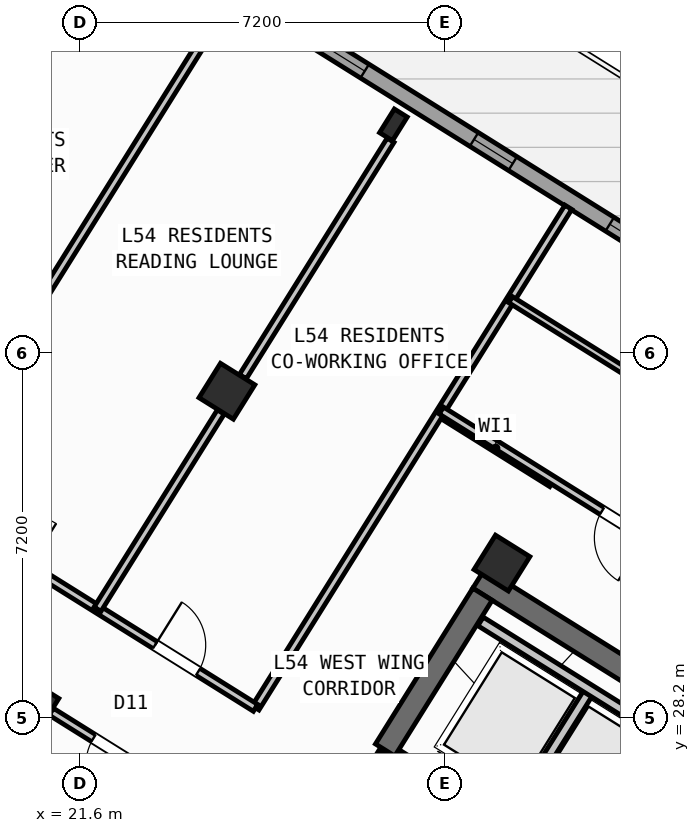
"""IFC4 building model, lengths in metres.
Left out: names, types, materials, properties, quantities, classifications, styles, units other than length and angle.
Written with IfcOpenShell. Run it as: python <this file> out.ifc"""

import sys

from ifc_helpers import new_model, si_unit, direction, frame, frame_2d, origin, origin_2d, place, context, subcontext, project, spatial, rectangle, hollow_rectangle, i_section, extrude, source, transform, mapped, element, fill, save


model = new_model("IFC4")
c1 = context("Model", 3, precision=1e-05, world=origin(), true_north=direction((0.0, 1.0)))
c2 = subcontext(c1, "Body", "Model", "MODEL_VIEW")
j1 = project(units=[si_unit("LENGTHUNIT", "METRE"), si_unit("PLANEANGLEUNIT", "RADIAN")], contexts=[c1])
p1 = place(None, origin())
s1 = spatial("IfcSite", under=j1, at=p1, CompositionType="ELEMENT")
p2 = place(p1, origin())
s2 = spatial("IfcBuilding", under=s1, at=p2, CompositionType="ELEMENT")
p3 = place(p2, frame((0.0, 0.0, 214.8)))
s3 = spatial("IfcBuildingStorey", under=s2, at=p3, CompositionType="ELEMENT", Elevation=214.8)
p4 = place(p3, frame((40.531, 24.036, 0.0), z_axis=(0.0, 0.0, 1.0), x_axis=(-0.848048787466, 0.529918157905, 0.0)))
e1 = element("IfcWall", 1, at=p4, inside=s3, PredefinedType="SHEAR", context=c2, shape_type="SweptSolid", body=[
    extrude(rectangle(XDim=13.04, YDim=0.45, at=frame_2d((6.52, 0.0))), origin(), (0.0, 0.0, 1.0), 3.35),
])
p5 = place(p3, frame((29.544, 30.636, 0.0), z_axis=(0.0, 0.0, 1.0), x_axis=(-0.529902075036, -0.848058836916, 0.0)))
e2 = element("IfcWall", 2, at=p5, inside=s3, PredefinedType="SHEAR", context=c2, shape_type="SweptSolid", body=[
    extrude(rectangle(XDim=3.625, YDim=0.45, at=frame_2d((1.812, 0.0))), origin(), (0.0, 0.0, 1.0), 3.35),
])
m1 = source(origin(), c2, "Body", "SweptSolid", [
    extrude(hollow_rectangle(XDim=0.8, YDim=0.8, WallThickness=0.032, at=origin_2d()), origin(), (0.0, 0.0, 1.0), 3.6),
])
p6 = place(p3, frame((29.928, 31.251, 0.0), z_axis=(0.0, 0.0, 1.0), x_axis=(-0.848048096156, 0.529919264233, 0.0)))
e3 = element("IfcColumn", 3, at=p6, inside=s3, PredefinedType="COLUMN", context=c2, shape_type="MappedRepresentation", body=[
    mapped(m1, transform((0.0, 0.0, 0.0), scale=1.0)),
])
m2 = source(origin(), c2, "Body", "SweptSolid", [
    extrude(i_section(OverallWidth=0.3, OverallDepth=0.55, WebThickness=0.015, FlangeThickness=0.029, at=origin_2d()), origin(), (0.0, 0.0, 1.0), 3.6),
])
p7 = place(p3, frame((27.786, 39.901, 0.0), z_axis=(0.0, 0.0, 1.0), x_axis=(-0.848048096156, 0.529919264233, 0.0)))
e4 = element("IfcColumn", 4, at=p7, inside=s3, PredefinedType="COLUMN", context=c2, shape_type="MappedRepresentation", body=[
    mapped(m2, transform((0.0, 0.0, 0.0), scale=1.0)),
])
for number, where, z_axis, x_axis in (
    (5, (24.5, 34.643, 0.0), (0.0, 0.0, 1.0), (-0.848, 0.53, 0.0)),
    (6, (20.632, 28.452, 0.0), (0.0, 0.0, 1.0), (-0.848, 0.53, 0.0)),
):
    element("IfcColumn", number, at=place(p3, frame(where, z_axis=z_axis, x_axis=x_axis)), inside=s3, PredefinedType="COLUMN", context=c2, shape_type="MappedRepresentation", body=[
        mapped(m1, transform((0.0, 0.0, 0.0), scale=1.0)),
    ])
p8 = place(p3, frame((31.76, 12.183, 0.0), z_axis=(0.0, 0.0, 1.0), x_axis=(-0.848047074256, 0.529920899612, 0.0)))
e7 = element("IfcWall", 7, at=p8, inside=s3, PredefinedType="STANDARD", context=c2, shape_type="SweptSolid", body=[
    extrude(rectangle(XDim=30.652, YDim=0.32, at=frame_2d((15.326, 0.0))), origin(), (0.0, 0.0, 1.0), 3.35),
])
p9 = place(p8, frame((15.166, 0.0, 0.0)))
e8 = element("IfcOpeningElement", 8, at=p9, cuts=e7, PredefinedType="OPENING", context=c2, shape_type="SweptSolid", body=[
    extrude(rectangle(XDim=1.2, YDim=2.15, at=frame_2d((0.6, 1.075))), frame((0.0, 0.17, 0.0), z_axis=(0.0, -1.0, 0.0), x_axis=(1.0, 0.0, 0.0)), (0.0, 0.0, 1.0), 0.34),
])
p10 = place(p8, frame((2.24, 0.0, 0.9)))
e9 = element("IfcOpeningElement", 9, at=p10, cuts=e7, PredefinedType="OPENING", context=c2, shape_type="SweptSolid", body=[
    extrude(rectangle(XDim=1.65, YDim=1.45, at=frame_2d((0.825, 0.725))), frame((0.0, 0.17, 0.0), z_axis=(0.0, -1.0, 0.0), x_axis=(1.0, 0.0, 0.0)), (0.0, 0.0, 1.0), 0.34),
])
p11 = place(p8, frame((7.469, 0.0, 0.9)))
e10 = element("IfcOpeningElement", 10, at=p11, cuts=e7, PredefinedType="OPENING", context=c2, shape_type="SweptSolid", body=[
    extrude(rectangle(XDim=1.65, YDim=1.45, at=frame_2d((0.825, 0.725))), frame((0.0, 0.17, 0.0), z_axis=(0.0, -1.0, 0.0), x_axis=(1.0, 0.0, 0.0)), (0.0, 0.0, 1.0), 0.34),
])
p12 = place(p8, frame((12.623, 0.0, 1.0)))
e11 = element("IfcOpeningElement", 11, at=p12, cuts=e7, PredefinedType="OPENING", context=c2, shape_type="SweptSolid", body=[
    extrude(rectangle(XDim=0.9, YDim=1.25, at=frame_2d((0.45, 0.625))), frame((0.0, 0.17, 0.0), z_axis=(0.0, -1.0, 0.0), x_axis=(1.0, 0.0, 0.0)), (0.0, 0.0, 1.0), 0.34),
])
p13 = place(p8, frame((19.715, 0.0, 1.0)))
e12 = element("IfcOpeningElement", 12, at=p13, cuts=e7, PredefinedType="OPENING", context=c2, shape_type="SweptSolid", body=[
    extrude(rectangle(XDim=0.9, YDim=1.25, at=frame_2d((0.45, 0.625))), frame((0.0, 0.17, 0.0), z_axis=(0.0, -1.0, 0.0), x_axis=(1.0, 0.0, 0.0)), (0.0, 0.0, 1.0), 0.34),
])
p14 = place(p8, frame((25.566, 0.0, 0.9)))
e13 = element("IfcOpeningElement", 13, at=p14, cuts=e7, PredefinedType="OPENING", context=c2, shape_type="SweptSolid", body=[
    extrude(rectangle(XDim=1.65, YDim=1.45, at=frame_2d((0.825, 0.725))), frame((0.0, 0.17, 0.0), z_axis=(0.0, -1.0, 0.0), x_axis=(1.0, 0.0, 0.0)), (0.0, 0.0, 1.0), 0.34),
])
p15 = place(p8, frame((28.896, 0.0, 1.0)))
e14 = element("IfcOpeningElement", 14, at=p15, cuts=e7, PredefinedType="OPENING", context=c2, shape_type="SweptSolid", body=[
    extrude(rectangle(XDim=0.9, YDim=1.25, at=frame_2d((0.45, 0.625))), frame((0.0, 0.17, 0.0), z_axis=(0.0, -1.0, 0.0), x_axis=(1.0, 0.0, 0.0)), (0.0, 0.0, 1.0), 0.34),
])
p16 = place(p3, frame((17.424, 47.083, 0.0), z_axis=(0.0, 0.0, 1.0), x_axis=(0.848049927979, -0.529916332693, 0.0)))
e15 = element("IfcWall", 15, at=p16, inside=s3, PredefinedType="STANDARD", context=c2, shape_type="SweptSolid", body=[
    extrude(rectangle(XDim=29.223, YDim=0.32, at=frame_2d((14.612, 0.0))), origin(), (0.0, 0.0, 1.0), 3.35),
])
p17 = place(p16, frame((2.526, 0.0, 0.0)))
e16 = element("IfcOpeningElement", 16, at=p17, cuts=e15, PredefinedType="OPENING", context=c2, shape_type="SweptSolid", body=[
    extrude(rectangle(XDim=1.05, YDim=2.15, at=frame_2d((0.525, 1.075))), frame((0.0, 0.17, 0.0), z_axis=(0.0, -1.0, 0.0), x_axis=(1.0, 0.0, 0.0)), (0.0, 0.0, 1.0), 0.34),
])
p18 = place(p16, frame((0.653, 0.0, 0.9)))
e17 = element("IfcOpeningElement", 17, at=p18, cuts=e15, PredefinedType="OPENING", context=c2, shape_type="SweptSolid", body=[
    extrude(rectangle(XDim=1.35, YDim=1.45, at=frame_2d((0.675, 0.725))), frame((0.0, 0.17, 0.0), z_axis=(0.0, -1.0, 0.0), x_axis=(1.0, 0.0, 0.0)), (0.0, 0.0, 1.0), 0.34),
])
p19 = place(p16, frame((6.897, 0.0, 1.0)))
e18 = element("IfcOpeningElement", 18, at=p19, cuts=e15, PredefinedType="OPENING", context=c2, shape_type="SweptSolid", body=[
    extrude(rectangle(XDim=0.9, YDim=1.25, at=frame_2d((0.45, 0.625))), frame((0.0, 0.17, 0.0), z_axis=(0.0, -1.0, 0.0), x_axis=(1.0, 0.0, 0.0)), (0.0, 0.0, 1.0), 0.34),
])
p20 = place(p16, frame((9.602, 0.0, 0.95)))
e19 = element("IfcOpeningElement", 19, at=p20, cuts=e15, PredefinedType="OPENING", context=c2, shape_type="SweptSolid", body=[
    extrude(rectangle(XDim=1.95, YDim=1.35, at=frame_2d((0.975, 0.675))), frame((0.0, 0.17, 0.0), z_axis=(0.0, -1.0, 0.0), x_axis=(1.0, 0.0, 0.0)), (0.0, 0.0, 1.0), 0.34),
])
p21 = place(p16, frame((14.096, 0.0, 1.0)))
e20 = element("IfcOpeningElement", 20, at=p21, cuts=e15, PredefinedType="OPENING", context=c2, shape_type="SweptSolid", body=[
    extrude(rectangle(XDim=0.9, YDim=1.25, at=frame_2d((0.45, 0.625))), frame((0.0, 0.17, 0.0), z_axis=(0.0, -1.0, 0.0), x_axis=(1.0, 0.0, 0.0)), (0.0, 0.0, 1.0), 0.34),
])
p22 = place(p16, frame((17.254, 0.0, 1.0)))
e21 = element("IfcOpeningElement", 21, at=p22, cuts=e15, PredefinedType="OPENING", context=c2, shape_type="SweptSolid", body=[
    extrude(rectangle(XDim=0.9, YDim=1.25, at=frame_2d((0.45, 0.625))), frame((0.0, 0.17, 0.0), z_axis=(0.0, -1.0, 0.0), x_axis=(1.0, 0.0, 0.0)), (0.0, 0.0, 1.0), 0.34),
])
p23 = place(p16, frame((21.139, 0.0, 0.9)))
e22 = element("IfcOpeningElement", 22, at=p23, cuts=e15, PredefinedType="OPENING", context=c2, shape_type="SweptSolid", body=[
    extrude(rectangle(XDim=1.35, YDim=1.45, at=frame_2d((0.675, 0.725))), frame((0.0, 0.17, 0.0), z_axis=(0.0, -1.0, 0.0), x_axis=(1.0, 0.0, 0.0)), (0.0, 0.0, 1.0), 0.34),
])
p24 = place(p16, frame((25.778, 0.0, 0.9)))
e23 = element("IfcOpeningElement", 23, at=p24, cuts=e15, PredefinedType="OPENING", context=c2, shape_type="SweptSolid", body=[
    extrude(rectangle(XDim=1.35, YDim=1.45, at=frame_2d((0.675, 0.725))), frame((0.0, 0.17, 0.0), z_axis=(0.0, -1.0, 0.0), x_axis=(1.0, 0.0, 0.0)), (0.0, 0.0, 1.0), 0.34),
])
p25 = place(p3, frame((33.496, 27.677, 0.0), z_axis=(0.0, 0.0, 1.0), x_axis=(-0.529908658664, -0.84805472316, 0.0)))
e24 = element("IfcWall", 24, at=p25, inside=s3, PredefinedType="SHEAR", context=c2, shape_type="SweptSolid", body=[
    extrude(rectangle(XDim=3.16, YDim=0.26, at=frame_2d((1.58, 0.0))), origin(), (0.0, 0.0, 1.0), 3.35),
])
p26 = place(p3, frame((31.822, 24.998, 0.0), z_axis=(0.0, 0.0, 1.0), x_axis=(-0.848054125777, 0.529909614701, 0.0)))
e25 = element("IfcWall", 25, at=p26, inside=s3, PredefinedType="STANDARD", context=c2, shape_type="SweptSolid", body=[
    extrude(rectangle(XDim=4.668, YDim=0.2, at=frame_2d((2.334, 0.0))), origin(), (0.0, 0.0, 1.0), 3.34),
])
p27 = place(p26, frame((0.52, 0.0, 0.0)))
e26 = element("IfcOpeningElement", 26, at=p27, cuts=e25, PredefinedType="OPENING", context=c2, shape_type="SweptSolid", body=[
    extrude(rectangle(XDim=1.2, YDim=2.15, at=frame_2d((0.6, 1.075))), frame((0.0, 0.11, 0.0), z_axis=(0.0, -1.0, 0.0), x_axis=(1.0, 0.0, 0.0)), (0.0, 0.0, 1.0), 0.22),
])
p28 = place(p26, frame((2.54, 0.0, 0.0)))
e27 = element("IfcOpeningElement", 27, at=p28, cuts=e25, PredefinedType="OPENING", context=c2, shape_type="SweptSolid", body=[
    extrude(rectangle(XDim=1.2, YDim=2.15, at=frame_2d((0.6, 1.075))), frame((0.0, 0.11, 0.0), z_axis=(0.0, -1.0, 0.0), x_axis=(1.0, 0.0, 0.0)), (0.0, 0.0, 1.0), 0.22),
])
p29 = place(p3, frame((31.645, 28.716, 0.0), z_axis=(0.0, 0.0, 1.0), x_axis=(-0.52986693015, -0.848080795876, 0.0)))
e28 = element("IfcWall", 28, at=p29, inside=s3, PredefinedType="STANDARD", context=c2, shape_type="SweptSolid", body=[
    extrude(rectangle(XDim=2.66, YDim=0.2, at=frame_2d((1.33, 0.0))), origin(), (0.0, 0.0, 1.0), 3.34),
])
p30 = place(p3, frame((33.363, 27.69, 0.0), z_axis=(0.0, 0.0, 1.0), x_axis=(-0.84804957148, 0.529916903215, 0.0)))
e29 = element("IfcWall", 29, at=p30, inside=s3, PredefinedType="STANDARD", context=c2, shape_type="SweptSolid", body=[
    extrude(rectangle(XDim=4.548, YDim=0.2, at=frame_2d((2.274, 0.0))), origin(), (0.0, 0.0, 1.0), 3.34),
])
p31 = place(p3, frame((27.596, 27.52, 0.0), z_axis=(0.0, 0.0, 1.0), x_axis=(-0.529865479138, -0.848081702443, 0.0)))
e30 = element("IfcWall", 30, at=p31, inside=s3, PredefinedType="STANDARD", context=c2, shape_type="SweptSolid", body=[
    extrude(rectangle(XDim=2.96, YDim=0.2, at=frame_2d((1.48, 0.0))), origin(), (0.0, 0.0, 1.0), 3.34),
])
p32 = place(p31, frame((0.7, 0.0, 0.0)))
e31 = element("IfcOpeningElement", 31, at=p32, cuts=e30, PredefinedType="OPENING", context=c2, shape_type="SweptSolid", body=[
    extrude(rectangle(XDim=1.5, YDim=2.15, at=frame_2d((0.75, 1.075))), frame((0.0, 0.11, 0.0), z_axis=(0.0, -1.0, 0.0), x_axis=(1.0, 0.0, 0.0)), (0.0, 0.0, 1.0), 0.22),
])
p33 = place(p3, frame((30.914, 32.829, 0.0), z_axis=(0.0, 0.0, 1.0), x_axis=(-0.848008813643, 0.529982124211, 0.0)))
e32 = element("IfcWall", 32, at=p33, inside=s3, PredefinedType="PARTITIONING", context=c2, shape_type="SweptSolid", body=[
    extrude(rectangle(XDim=2.61, YDim=0.16, at=frame_2d((1.305, 0.0))), origin(), (0.0, 0.0, 1.0), 3.34),
])
p34 = place(p3, frame((31.239, 38.274, 0.0), z_axis=(0.0, 0.0, 1.0), x_axis=(-0.529925472745, -0.848044216616, 0.0)))
e33 = element("IfcWall", 33, at=p34, inside=s3, PredefinedType="PARTITIONING", context=c2, shape_type="SweptSolid", body=[
    extrude(rectangle(XDim=11.65, YDim=0.16, at=frame_2d((5.825, 0.0))), origin(), (0.0, 0.0, 1.0), 3.34),
])
p35 = place(p3, frame((25.065, 28.394, 0.0), z_axis=(0.0, 0.0, 1.0), x_axis=(-0.848048310262, 0.529918921593, 0.0)))
e34 = element("IfcWall", 34, at=p35, inside=s3, PredefinedType="PARTITIONING", context=c2, shape_type="SweptSolid", body=[
    extrude(rectangle(XDim=16.73, YDim=0.16, at=frame_2d((8.365, 0.0))), origin(), (0.0, 0.0, 1.0), 3.34),
])
p36 = place(p35, frame((1.338, 0.0, 0.0)))
e35 = element("IfcOpeningElement", 35, at=p36, cuts=e34, PredefinedType="OPENING", context=c2, shape_type="SweptSolid", body=[
    extrude(rectangle(XDim=1.0, YDim=2.1, at=frame_2d((0.5, 1.05))), frame((0.0, 0.09, 0.0), z_axis=(0.0, -1.0, 0.0), x_axis=(1.0, 0.0, 0.0)), (0.0, 0.0, 1.0), 0.18),
])
p37 = place(p35, frame((5.265, 0.0, 0.0)))
e36 = element("IfcOpeningElement", 36, at=p37, cuts=e34, PredefinedType="OPENING", context=c2, shape_type="SweptSolid", body=[
    extrude(rectangle(XDim=1.0, YDim=2.1, at=frame_2d((0.5, 1.05))), frame((0.0, 0.09, 0.0), z_axis=(0.0, -1.0, 0.0), x_axis=(1.0, 0.0, 0.0)), (0.0, 0.0, 1.0), 0.18),
])
p38 = place(p35, frame((9.526, 0.0, 0.0)))
e37 = element("IfcOpeningElement", 37, at=p38, cuts=e34, PredefinedType="OPENING", context=c2, shape_type="SweptSolid", body=[
    extrude(rectangle(XDim=1.0, YDim=2.1, at=frame_2d((0.5, 1.05))), frame((0.0, 0.09, 0.0), z_axis=(0.0, -1.0, 0.0), x_axis=(1.0, 0.0, 0.0)), (0.0, 0.0, 1.0), 0.18),
])
p39 = place(p35, frame((13.954, 0.0, 0.0)))
e38 = element("IfcOpeningElement", 38, at=p39, cuts=e34, PredefinedType="OPENING", context=c2, shape_type="SweptSolid", body=[
    extrude(rectangle(XDim=1.0, YDim=2.1, at=frame_2d((0.5, 1.05))), frame((0.0, 0.09, 0.0), z_axis=(0.0, -1.0, 0.0), x_axis=(1.0, 0.0, 0.0)), (0.0, 0.0, 1.0), 0.18),
])
p40 = place(p3, frame((23.899, 26.529, 0.0), z_axis=(0.0, 0.0, 1.0), x_axis=(-0.848055143312, 0.529907986259, 0.0)))
e39 = element("IfcWall", 39, at=p40, inside=s3, PredefinedType="PARTITIONING", context=c2, shape_type="SweptSolid", body=[
    extrude(rectangle(XDim=3.378, YDim=0.16, at=frame_2d((1.689, 0.0))), origin(), (0.0, 0.0, 1.0), 2.825),
])
p41 = place(p40, frame((1.395, 0.0, 0.0)))
e40 = element("IfcOpeningElement", 40, at=p41, cuts=e39, PredefinedType="OPENING", context=c2, shape_type="SweptSolid", body=[
    extrude(rectangle(XDim=1.0, YDim=2.1, at=frame_2d((0.5, 1.05))), frame((0.0, 0.09, 0.0), z_axis=(0.0, -1.0, 0.0), x_axis=(1.0, 0.0, 0.0)), (0.0, 0.0, 1.0), 0.18),
])
p42 = place(p3, frame((27.73, 39.597, 0.0), z_axis=(0.0, 0.0, 1.0), x_axis=(-0.529919150083, -0.848048167486, 0.0)))
e41 = element("IfcWall", 41, at=p42, inside=s3, PredefinedType="PARTITIONING", context=c2, shape_type="SweptSolid", body=[
    extrude(rectangle(XDim=5.501, YDim=0.16, at=frame_2d((2.75, 0.0))), origin(), (0.0, 0.0, 1.0), 2.825),
])
p43 = place(p3, frame((24.379, 34.233, 0.0), z_axis=(0.0, 0.0, 1.0), x_axis=(-0.529922402838, -0.84804613493, 0.0)))
e42 = element("IfcWall", 42, at=p43, inside=s3, PredefinedType="PARTITIONING", context=c2, shape_type="SweptSolid", body=[
    extrude(rectangle(XDim=4.588, YDim=0.16, at=frame_2d((2.294, 0.0))), origin(), (0.0, 0.0, 1.0), 2.825),
])
p44 = place(p3, frame((24.578, 42.436, 0.0), z_axis=(0.0, 0.0, 1.0), x_axis=(-0.529916055051, -0.848050101468, 0.0)))
e43 = element("IfcWall", 43, at=p44, inside=s3, PredefinedType="PARTITIONING", context=c2, shape_type="SweptSolid", body=[
    extrude(rectangle(XDim=11.65, YDim=0.16, at=frame_2d((5.825, 0.0))), origin(), (0.0, 0.0, 1.0), 2.995),
])
p45 = place(p3, frame((41.936, 26.012, 0.0), z_axis=(0.0, 0.0, 1.0), x_axis=(-0.848051154596, 0.529914369676, 0.0)))
e44 = element("IfcWall", 44, at=p45, inside=s3, PredefinedType="PARTITIONING", context=c2, shape_type="SweptSolid", body=[
    extrude(rectangle(XDim=15.57, YDim=0.16, at=frame_2d((7.785, 0.0))), origin(), (0.0, 0.0, 1.0), 3.34),
])
p46 = place(p45, frame((10.83, 0.0, 0.0)))
e45 = element("IfcOpeningElement", 45, at=p46, cuts=e44, PredefinedType="OPENING", context=c2, shape_type="SweptSolid", body=[
    extrude(rectangle(XDim=1.0, YDim=2.1, at=frame_2d((0.5, 1.05))), frame((0.0, 0.09, 0.0), z_axis=(0.0, -1.0, 0.0), x_axis=(1.0, 0.0, 0.0)), (0.0, 0.0, 1.0), 0.18),
])
p47 = place(p3, frame((42.226, 28.873, 0.0), z_axis=(0.0, 0.0, 1.0), x_axis=(-0.848049134363, 0.529917602752, 0.0)))
e46 = element("IfcWall", 46, at=p47, inside=s3, PredefinedType="PLUMBINGWALL", context=c2, shape_type="SweptSolid", body=[
    extrude(rectangle(XDim=14.3, YDim=0.14, at=frame_2d((7.15, 0.0))), origin(), (0.0, 0.0, 1.0), 3.34),
])
p48 = place(p47, frame((9.57, 0.0, 0.0)))
e47 = element("IfcOpeningElement", 47, at=p48, cuts=e46, PredefinedType="OPENING", context=c2, shape_type="SweptSolid", body=[
    extrude(rectangle(XDim=0.92, YDim=2.08, at=frame_2d((0.46, 1.04))), frame((0.0, 0.08, 0.0), z_axis=(0.0, -1.0, 0.0), x_axis=(1.0, 0.0, 0.0)), (0.0, 0.0, 1.0), 0.16),
])
m3 = source(origin(), c2, "Body", "SweptSolid", [
    extrude(rectangle(XDim=1.95, YDim=1.35, at=frame_2d((0.975, 0.675))), frame((0.0, 0.03, 0.0), z_axis=(0.0, -1.0, 0.0), x_axis=(1.0, 0.0, 0.0)), (0.0, 0.0, 1.0), 0.06),
])
p49 = place(p20, origin())
e48 = element("IfcWindow", 48, at=p49, inside=s3, PartitioningType="SINGLE_PANEL", PredefinedType="WINDOW", context=c2, shape_type="MappedRepresentation", body=[
    mapped(m3, transform((0.0, 0.0, 0.0), scale=1.0)),
])
fill(e19, e48)
m4 = source(origin(), c2, "Body", "SweptSolid", [
    extrude(rectangle(XDim=0.9, YDim=1.25, at=frame_2d((0.45, 0.625))), frame((0.0, 0.03, 0.0), z_axis=(0.0, -1.0, 0.0), x_axis=(1.0, 0.0, 0.0)), (0.0, 0.0, 1.0), 0.06),
])
p50 = place(p21, origin())
e49 = element("IfcWindow", 49, at=p50, inside=s3, PartitioningType="SINGLE_PANEL", PredefinedType="WINDOW", context=c2, shape_type="MappedRepresentation", body=[
    mapped(m4, transform((0.0, 0.0, 0.0), scale=1.0)),
])
fill(e20, e49)
p51 = place(p22, origin())
e50 = element("IfcWindow", 50, at=p51, inside=s3, PartitioningType="SINGLE_PANEL", PredefinedType="WINDOW", context=c2, shape_type="MappedRepresentation", body=[
    mapped(m4, transform((0.0, 0.0, 0.0), scale=1.0)),
])
fill(e21, e50)
m5 = source(origin(), c2, "Body", "SweptSolid", [
    extrude(rectangle(XDim=1.0, YDim=2.1, at=frame_2d((0.5, 1.05))), frame((0.0, 0.025, 0.0), z_axis=(0.0, -1.0, 0.0), x_axis=(1.0, 0.0, 0.0)), (0.0, 0.0, 1.0), 0.05),
])
p52 = place(p41, origin())
e51 = element("IfcDoor", 51, at=p52, inside=s3, OperationType="SINGLE_SWING_LEFT", PredefinedType="DOOR", context=c2, shape_type="MappedRepresentation", body=[
    mapped(m5, transform((0.0, 0.0, 0.0), scale=1.0)),
])
fill(e40, e51)
p53 = place(p36, frame((1.0, 0.0, 0.0), z_axis=(0.0, 0.0, 1.0), x_axis=(-1.0, 0.0, 0.0)))
e52 = element("IfcDoor", 52, at=p53, inside=s3, OperationType="SINGLE_SWING_LEFT", PredefinedType="DOOR", context=c2, shape_type="MappedRepresentation", body=[
    mapped(m5, transform((0.0, 0.0, 0.0), scale=1.0)),
])
fill(e35, e52)
p54 = place(p46, origin())
e53 = element("IfcDoor", 53, at=p54, inside=s3, OperationType="SINGLE_SWING_LEFT", PredefinedType="DOOR", context=c2, shape_type="MappedRepresentation", body=[
    mapped(m5, transform((0.0, 0.0, 0.0), scale=1.0)),
])
fill(e45, e53)
save(model, sys.argv[1])
